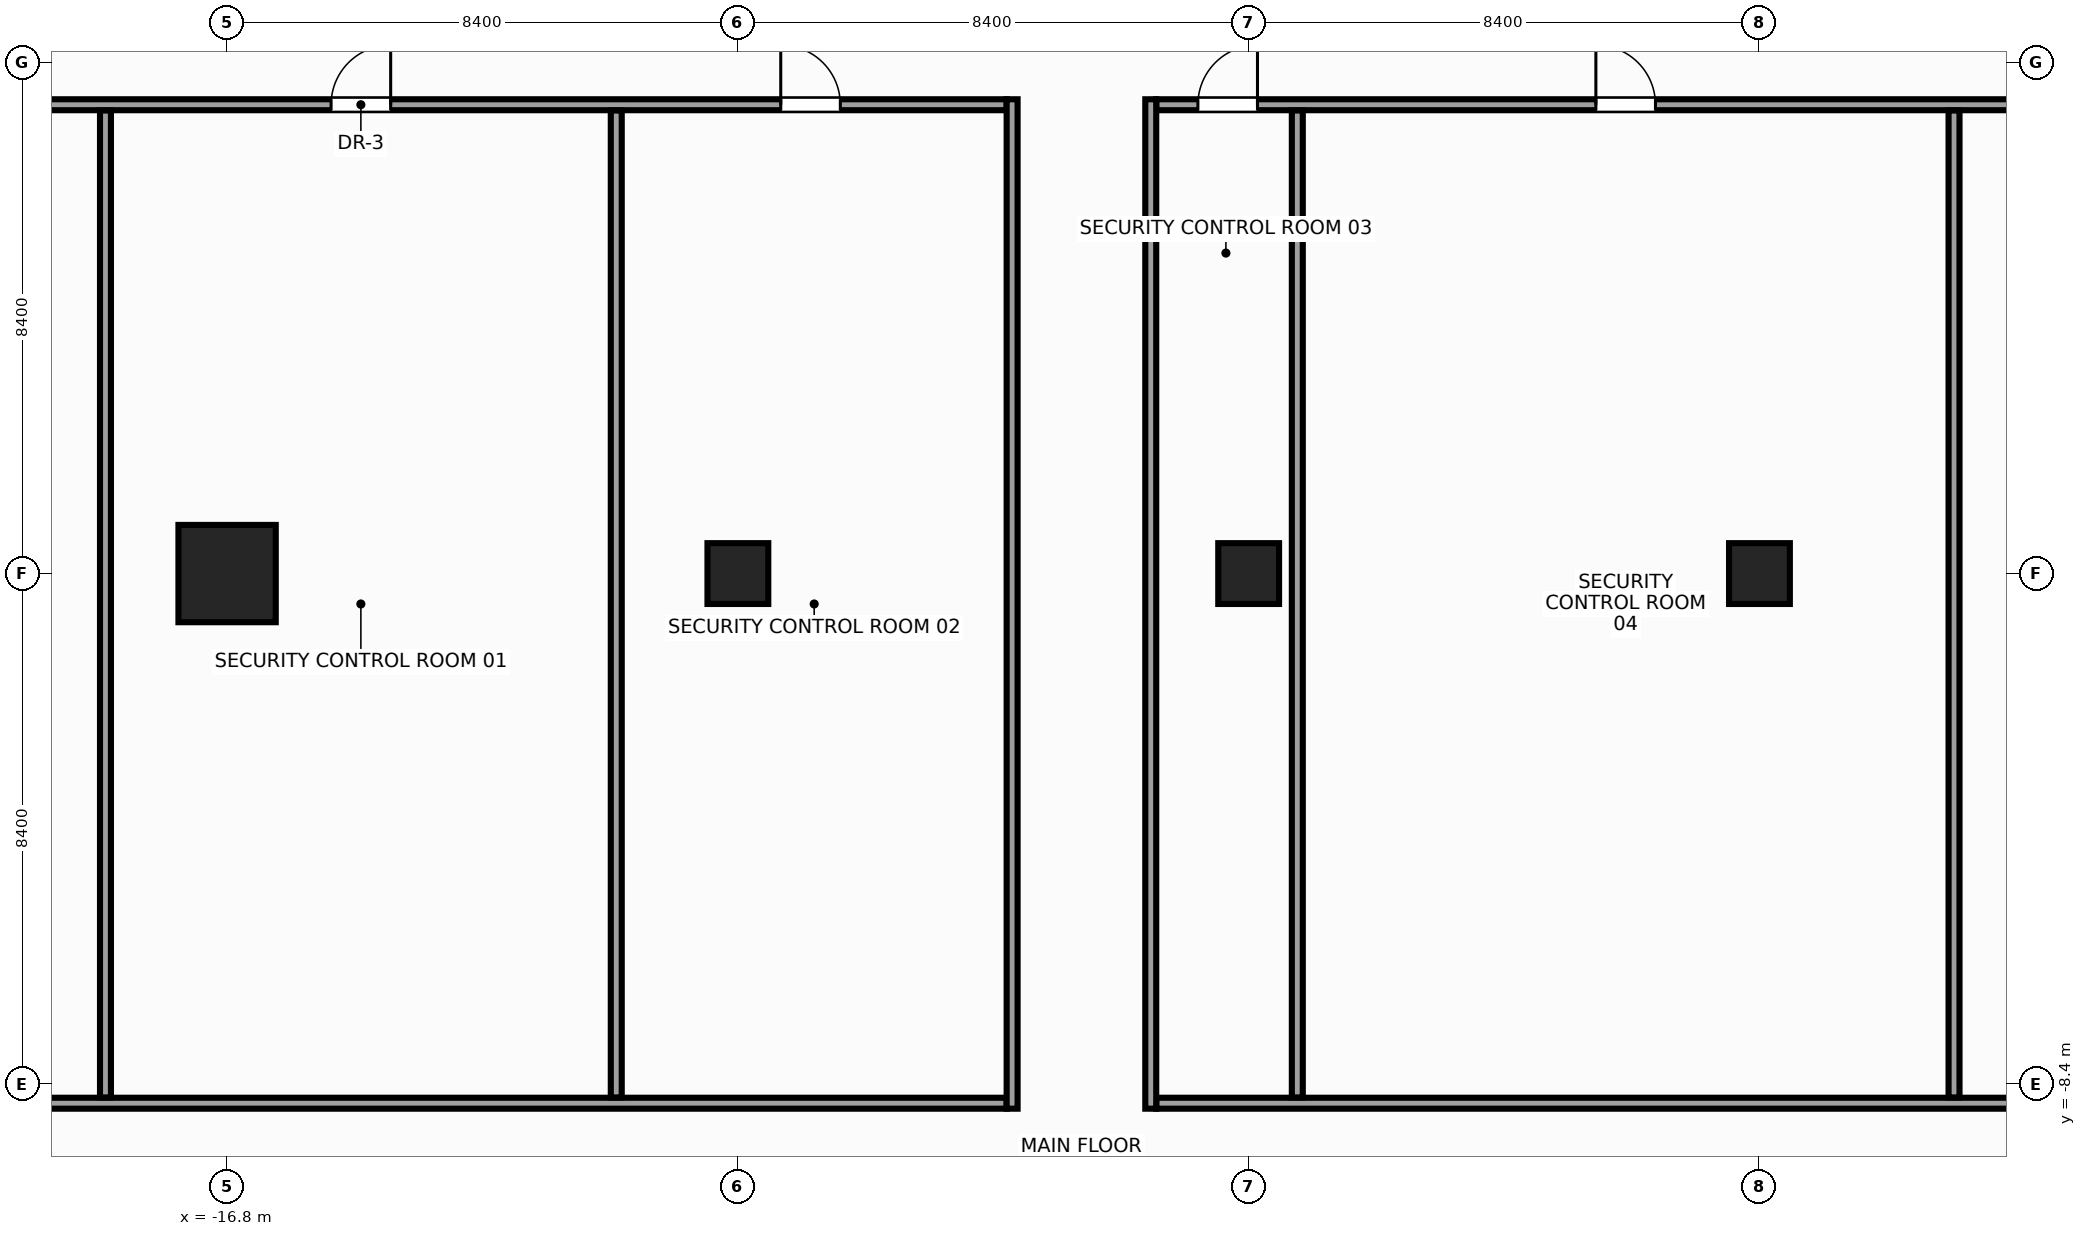
"""IFC4 building model, lengths in metres.
Left out: names, types, materials, properties, quantities, classifications, styles, units other than length and angle.
Written with IfcOpenShell. Run it as: python <this file> out.ifc"""

import sys

from ifc_helpers import new_model, si_unit, direction, frame, frame_2d, origin, origin_with_axes, origin_2d, place, context, subcontext, project, spatial, rectangle, hollow_rectangle, extrude, source, transform, mapped, element, fill, save


model = new_model("IFC4")
c1 = context("Model", 3, precision=1e-05, world=origin(), true_north=direction((0.0, 1.0)))
c2 = subcontext(c1, "Body", "Model", "MODEL_VIEW")
j1 = project(units=[si_unit("LENGTHUNIT", "METRE"), si_unit("PLANEANGLEUNIT", "RADIAN")], contexts=[c1])
p1 = place(None, origin())
s1 = spatial("IfcSite", under=j1, at=p1, CompositionType="ELEMENT")
p2 = place(p1, origin())
s2 = spatial("IfcBuilding", under=s1, at=p2, CompositionType="ELEMENT")
p3 = place(p2, frame((0.0, 0.0, 117.2)))
s3 = spatial("IfcBuildingStorey", under=s2, at=p3, CompositionType="ELEMENT", Elevation=117.2)
m1 = source(origin(), c2, "Body", "SweptSolid", [
    extrude(rectangle(XDim=1.6, YDim=1.6, at=origin_2d()), origin(), (0.0, 0.0, 1.0), 3.6),
])
p4 = place(p3, frame((-16.8, 0.0, 0.0), z_axis=(0.0, 0.0, 1.0), x_axis=(1.0, 0.0, 0.0)))
e1 = element("IfcColumn", 1, at=p4, inside=s3, PredefinedType="COLUMN", context=c2, shape_type="MappedRepresentation", body=[
    mapped(m1, transform((0.0, 0.0, 0.0), x_axis=(1.0, 0.0, 0.0), y_axis=(0.0, 1.0, 0.0), z_axis=(0.0, 0.0, 1.0), scale=1.0)),
])
m2 = source(origin(), c2, "Body", "SweptSolid", [
    extrude(hollow_rectangle(XDim=1.0, YDim=1.0, WallThickness=0.045, at=origin_2d()), origin(), (0.0, 0.0, 1.0), 3.6),
])
for number, where, z_axis, x_axis in (
    (2, (-8.4, 0.0, 0.0), (0.0, 0.0, 1.0), (1.0, 0.0, 0.0)),
    (3, (8.4, 0.0, 0.0), (0.0, 0.0, 1.0), (1.0, 0.0, 0.0)),
):
    element("IfcColumn", number, at=place(p3, frame(where, z_axis=z_axis, x_axis=x_axis)), inside=s3, PredefinedType="COLUMN", context=c2, shape_type="MappedRepresentation", body=[
        mapped(m2, transform((0.0, 0.0, 0.0), x_axis=(1.0, 0.0, 0.0), y_axis=(0.0, 1.0, 0.0), z_axis=(0.0, 0.0, 1.0), scale=1.0)),
    ])
m3 = source(origin(), c2, "Body", "SweptSolid", [
    extrude(rectangle(XDim=1.0, YDim=1.0, at=origin_2d()), origin(), (0.0, 0.0, 1.0), 3.6),
])
p5 = place(p3, origin_with_axes())
e4 = element("IfcColumn", 4, at=p5, inside=s3, PredefinedType="COLUMN", context=c2, shape_type="MappedRepresentation", body=[
    mapped(m3, transform((0.0, 0.0, 0.0), x_axis=(1.0, 0.0, 0.0), y_axis=(0.0, 1.0, 0.0), z_axis=(0.0, 0.0, 1.0), scale=1.0)),
])
m4 = source(origin(), c2, "Body", "SweptSolid", [
    extrude(rectangle(XDim=16.8, YDim=0.18, at=frame_2d((8.4, 0.0))), origin(), (0.0, 0.0, 1.0), 2.745),
])
p6 = place(p3, frame((-20.78, 7.71, 0.0), z_axis=(0.0, 0.0, 1.0), x_axis=(1.0, 0.0, 0.0)))
e5 = element("IfcWall", 5, at=p6, inside=s3, PredefinedType="PARTITIONING", context=c2, shape_type="MappedRepresentation", body=[
    mapped(m4, transform((0.0, 0.0, 0.0), x_axis=(1.0, 0.0, 0.0), y_axis=(0.0, 1.0, 0.0), z_axis=(0.0, 0.0, 1.0), scale=1.0)),
])
p7 = place(p6, frame((5.69, 0.0, 0.0)))
e6 = element("IfcOpeningElement", 6, at=p7, cuts=e5, PredefinedType="OPENING", context=c2, shape_type="SweptSolid", body=[
    extrude(rectangle(XDim=0.98, YDim=2.15, at=frame_2d((0.49, 1.075))), frame((0.0, 0.102, 0.0), z_axis=(0.0, -1.0, 0.0), x_axis=(1.0, 0.0, 0.0)), (0.0, 0.0, 1.0), 0.204),
])
p8 = place(p6, frame((13.085, 0.0, 0.0)))
e7 = element("IfcOpeningElement", 7, at=p8, cuts=e5, PredefinedType="OPENING", context=c2, shape_type="SweptSolid", body=[
    extrude(rectangle(XDim=0.98, YDim=2.15, at=frame_2d((0.49, 1.075))), frame((0.0, 0.102, 0.0), z_axis=(0.0, -1.0, 0.0), x_axis=(1.0, 0.0, 0.0)), (0.0, 0.0, 1.0), 0.204),
])
m5 = source(origin(), c2, "Body", "SweptSolid", [
    extrude(rectangle(XDim=22.3, YDim=0.18, at=frame_2d((11.15, 0.0))), origin(), (0.0, 0.0, 1.0), 2.745),
])
p9 = place(p3, frame((-1.52, 7.71, 0.0), z_axis=(0.0, 0.0, 1.0), x_axis=(1.0, 0.0, 0.0)))
e8 = element("IfcWall", 8, at=p9, inside=s3, PredefinedType="PARTITIONING", context=c2, shape_type="MappedRepresentation", body=[
    mapped(m5, transform((0.0, 0.0, 0.0), x_axis=(1.0, 0.0, 0.0), y_axis=(0.0, 1.0, 0.0), z_axis=(0.0, 0.0, 1.0), scale=1.0)),
])
p10 = place(p9, frame((0.685, 0.0, 0.0)))
e9 = element("IfcOpeningElement", 9, at=p10, cuts=e8, PredefinedType="OPENING", context=c2, shape_type="SweptSolid", body=[
    extrude(rectangle(XDim=0.98, YDim=2.15, at=frame_2d((0.49, 1.075))), frame((0.0, 0.102, 0.0), z_axis=(0.0, -1.0, 0.0), x_axis=(1.0, 0.0, 0.0)), (0.0, 0.0, 1.0), 0.204),
])
p11 = place(p9, frame((7.23, 0.0, 0.0)))
e10 = element("IfcOpeningElement", 10, at=p11, cuts=e8, PredefinedType="OPENING", context=c2, shape_type="SweptSolid", body=[
    extrude(rectangle(XDim=0.98, YDim=2.15, at=frame_2d((0.49, 1.075))), frame((0.0, 0.102, 0.0), z_axis=(0.0, -1.0, 0.0), x_axis=(1.0, 0.0, 0.0)), (0.0, 0.0, 1.0), 0.204),
])
p12 = place(p9, frame((17.195, 0.0, 0.0)))
e11 = element("IfcOpeningElement", 11, at=p12, cuts=e8, PredefinedType="OPENING", context=c2, shape_type="SweptSolid", body=[
    extrude(rectangle(XDim=0.98, YDim=2.15, at=frame_2d((0.49, 1.075))), frame((0.0, 0.102, 0.0), z_axis=(0.0, -1.0, 0.0), x_axis=(1.0, 0.0, 0.0)), (0.0, 0.0, 1.0), 0.204),
])
p13 = place(p3, frame((-20.78, -8.71, 0.0), z_axis=(0.0, 0.0, 1.0), x_axis=(1.0, 0.0, 0.0)))
e12 = element("IfcWall", 12, at=p13, inside=s3, PredefinedType="PARTITIONING", context=c2, shape_type="MappedRepresentation", body=[
    mapped(m4, transform((0.0, 0.0, 0.0), x_axis=(1.0, 0.0, 0.0), y_axis=(0.0, 1.0, 0.0), z_axis=(0.0, 0.0, 1.0), scale=1.0)),
])
p14 = place(p3, frame((-1.52, -8.71, 0.0), z_axis=(0.0, 0.0, 1.0), x_axis=(1.0, 0.0, 0.0)))
e13 = element("IfcWall", 13, at=p14, inside=s3, PredefinedType="PARTITIONING", context=c2, shape_type="MappedRepresentation", body=[
    mapped(m5, transform((0.0, 0.0, 0.0), x_axis=(1.0, 0.0, 0.0), y_axis=(0.0, 1.0, 0.0), z_axis=(0.0, 0.0, 1.0), scale=1.0)),
])
m6 = source(origin(), c2, "Body", "SweptSolid", [
    extrude(rectangle(XDim=16.6, YDim=0.18, at=frame_2d((8.3, 0.0))), origin(), (0.0, 0.0, 1.0), 2.645),
])
for number, where, z_axis, x_axis in (
    (14, (-3.89, -8.8, 0.0), (0.0, 0.0, 1.0), (0.0, 1.0, 0.0)),
    (15, (-1.61, -8.8, 0.0), (0.0, 0.0, 1.0), (0.0, 1.0, 0.0)),
):
    element("IfcWall", number, at=place(p3, frame(where, z_axis=z_axis, x_axis=x_axis)), inside=s3, PredefinedType="PARTITIONING", context=c2, shape_type="MappedRepresentation", body=[
        mapped(m6, transform((0.0, 0.0, 0.0), x_axis=(1.0, 0.0, 0.0), y_axis=(0.0, 1.0, 0.0), z_axis=(0.0, 0.0, 1.0), scale=1.0)),
    ])
m7 = source(origin(), c2, "Body", "SweptSolid", [
    extrude(rectangle(XDim=16.23, YDim=0.18, at=frame_2d((8.115, 0.0))), origin(), (0.0, 0.0, 1.0), 2.745),
])
p15 = place(p3, frame((-18.8, -8.615, 0.0), z_axis=(0.0, 0.0, 1.0), x_axis=(0.0, 1.0, 0.0)))
e16 = element("IfcWall", 16, at=p15, inside=s3, PredefinedType="PARTITIONING", context=c2, shape_type="MappedRepresentation", body=[
    mapped(m7, transform((0.0, 0.0, 0.0), x_axis=(1.0, 0.0, 0.0), y_axis=(0.0, 1.0, 0.0), z_axis=(0.0, 0.0, 1.0), scale=1.0)),
])
m8 = source(origin(), c2, "Body", "SweptSolid", [
    extrude(rectangle(XDim=16.23, YDim=0.18, at=frame_2d((8.115, 0.0))), origin(), (0.0, 0.0, 1.0), 2.645),
])
for number, where, z_axis, x_axis in (
    (17, (-10.4, -8.615, 0.0), (0.0, 0.0, 1.0), (0.0, 1.0, 0.0)),
    (18, (0.8, -8.615, 0.0), (0.0, 0.0, 1.0), (0.0, 1.0, 0.0)),
    (19, (11.6, -8.615, 0.0), (0.0, 0.0, 1.0), (0.0, 1.0, 0.0)),
):
    element("IfcWall", number, at=place(p3, frame(where, z_axis=z_axis, x_axis=x_axis)), inside=s3, PredefinedType="PARTITIONING", context=c2, shape_type="MappedRepresentation", body=[
        mapped(m8, transform((0.0, 0.0, 0.0), x_axis=(1.0, 0.0, 0.0), y_axis=(0.0, 1.0, 0.0), z_axis=(0.0, 0.0, 1.0), scale=1.0)),
    ])
m9 = source(origin(), c2, "Body", "SweptSolid", [
    extrude(rectangle(XDim=0.98, YDim=2.15, at=frame_2d((0.49, 1.075))), frame((0.0, 0.025, 0.0), z_axis=(0.0, -1.0, 0.0), x_axis=(1.0, 0.0, 0.0)), (0.0, 0.0, 1.0), 0.05),
])
p16 = place(p7, origin())
e20 = element("IfcDoor", 20, at=p16, inside=s3, OperationType="SINGLE_SWING_RIGHT", PredefinedType="DOOR", context=c2, shape_type="MappedRepresentation", body=[
    mapped(m9, transform((0.0, 0.0, 0.0), x_axis=(1.0, 0.0, 0.0), y_axis=(0.0, 1.0, 0.0), z_axis=(0.0, 0.0, 1.0), scale=1.0)),
])
fill(e6, e20)
p17 = place(p8, origin())
e21 = element("IfcDoor", 21, at=p17, inside=s3, OperationType="SINGLE_SWING_LEFT", PredefinedType="DOOR", context=c2, shape_type="MappedRepresentation", body=[
    mapped(m9, transform((0.0, 0.0, 0.0), x_axis=(1.0, 0.0, 0.0), y_axis=(0.0, 1.0, 0.0), z_axis=(0.0, 0.0, 1.0), scale=1.0)),
])
fill(e7, e21)
p18 = place(p10, origin())
e22 = element("IfcDoor", 22, at=p18, inside=s3, OperationType="SINGLE_SWING_RIGHT", PredefinedType="DOOR", context=c2, shape_type="MappedRepresentation", body=[
    mapped(m9, transform((0.0, 0.0, 0.0), x_axis=(1.0, 0.0, 0.0), y_axis=(0.0, 1.0, 0.0), z_axis=(0.0, 0.0, 1.0), scale=1.0)),
])
fill(e9, e22)
p19 = place(p11, origin())
e23 = element("IfcDoor", 23, at=p19, inside=s3, OperationType="SINGLE_SWING_LEFT", PredefinedType="DOOR", context=c2, shape_type="MappedRepresentation", body=[
    mapped(m9, transform((0.0, 0.0, 0.0), x_axis=(1.0, 0.0, 0.0), y_axis=(0.0, 1.0, 0.0), z_axis=(0.0, 0.0, 1.0), scale=1.0)),
])
fill(e10, e23)
save(model, sys.argv[1])
